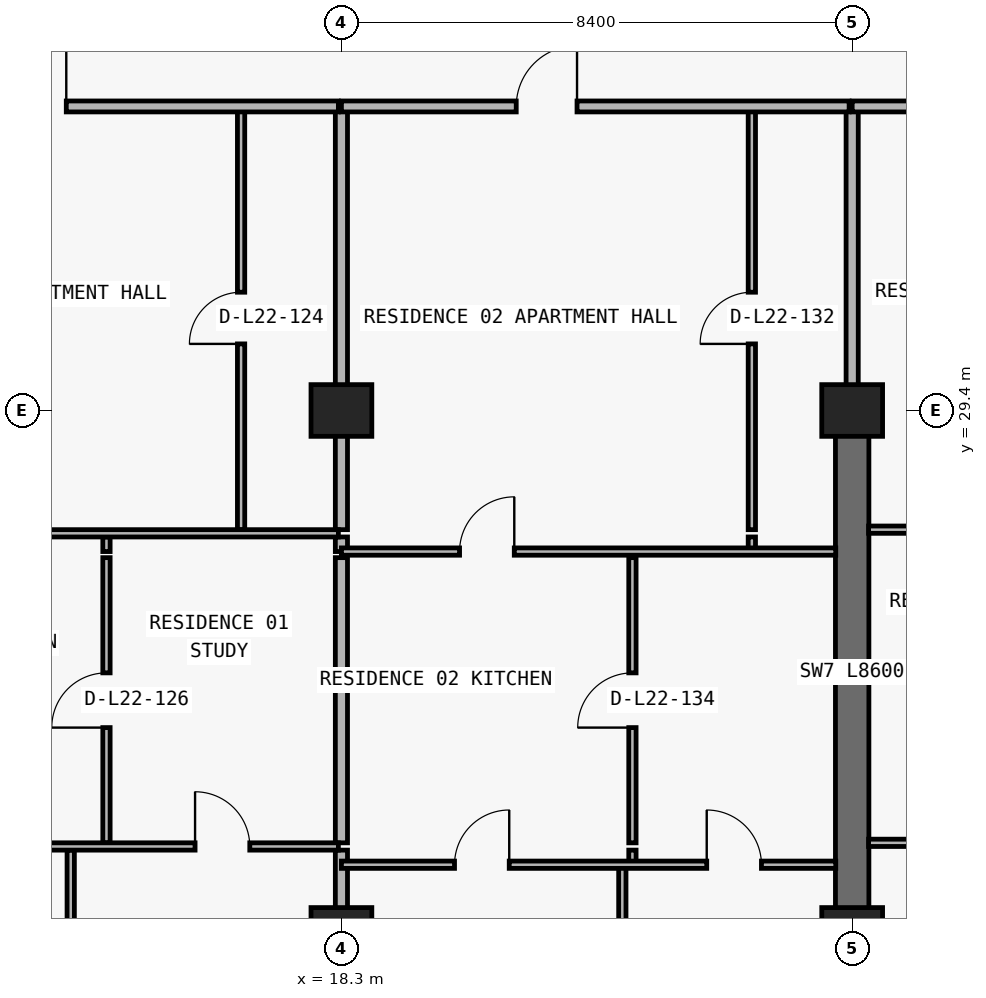
"""IFC4 building model, lengths in metres.
Left out: names, types, materials, properties, quantities, classifications, styles, units other than length and angle.
Written with IfcOpenShell. Run it as: python <this file> out.ifc"""

import sys

from ifc_helpers import new_model, si_unit, direction, frame, frame_2d, origin, origin_2d, place, context, subcontext, project, spatial, rectangle, extrude, element, fill, save


model = new_model("IFC4")
c1 = context("Model", 3, precision=1e-05, world=origin(), true_north=direction((0.0, 1.0)))
c2 = subcontext(c1, "Body", "Model", "MODEL_VIEW")
j1 = project(units=[si_unit("LENGTHUNIT", "METRE"), si_unit("PLANEANGLEUNIT", "RADIAN")], contexts=[c1])
p1 = place(None, origin())
s1 = spatial("IfcSite", under=j1, at=p1, CompositionType="ELEMENT")
p2 = place(p1, origin())
s2 = spatial("IfcBuilding", under=s1, at=p2, CompositionType="ELEMENT")
p3 = place(p2, frame((0.0, 0.0, 84.6)))
s3 = spatial("IfcBuildingStorey", under=s2, at=p3, CompositionType="ELEMENT", Elevation=84.6)
for number, where, z_axis, x_axis in (
    (1, (18.3, 20.8, 0.0), (0.0, 0.0, 1.0), (1.0, 0.0, 0.0)),
    (2, (26.7, 20.8, 0.0), (0.0, 0.0, 1.0), (1.0, 0.0, 0.0)),
    (3, (18.3, 29.4, 0.0), (0.0, 0.0, 1.0), (1.0, 0.0, 0.0)),
    (4, (26.7, 29.4, 0.0), (0.0, 0.0, 1.0), (1.0, 0.0, 0.0)),
):
    element("IfcColumn", number, at=place(p3, frame(where, z_axis=z_axis, x_axis=x_axis)), inside=s3, PredefinedType="COLUMN", context=c2, shape_type="SweptSolid", body=[
        extrude(rectangle(XDim=1.0, YDim=0.85, at=origin_2d()), origin(), (0.0, 0.0, 1.0), 3.05),
    ])
p4 = place(p3, frame((26.7, 20.8, 0.0), z_axis=(0.0, 0.0, 1.0), x_axis=(0.0, 1.0, 0.0)))
e5 = element("IfcWall", 5, at=p4, inside=s3, PredefinedType="SHEAR", context=c2, shape_type="SweptSolid", body=[
    extrude(rectangle(XDim=8.6, YDim=0.55, at=frame_2d((4.3, 0.0))), origin(), (0.0, 0.0, 1.0), 3.05),
])
p5 = place(p3, frame((13.848, 8.84, 0.0), z_axis=(0.0, 0.0, 1.0), x_axis=(0.0, 1.0, 0.0)))
e6 = element("IfcWall", 6, at=p5, inside=s3, PredefinedType="PARTITIONING", context=c2, shape_type="SweptSolid", body=[
    extrude(rectangle(XDim=13.33, YDim=0.12, at=frame_2d((6.665, 0.0))), origin(), (0.0, 0.0, 1.0), 3.05),
])
p6 = place(p3, frame((14.436, 22.29, 0.0), z_axis=(0.0, 0.0, 1.0), x_axis=(0.0, 1.0, 0.0)))
e7 = element("IfcWall", 7, at=p6, inside=s3, PredefinedType="PARTITIONING", context=c2, shape_type="SweptSolid", body=[
    extrude(rectangle(XDim=4.69, YDim=0.12, at=frame_2d((2.345, 0.0))), origin(), (0.0, 0.0, 1.0), 3.05),
])
p7 = place(p6, frame((1.895, 0.0, 0.0)))
e8 = element("IfcOpeningElement", 8, at=p7, cuts=e7, PredefinedType="OPENING", context=c2, shape_type="SweptSolid", body=[
    extrude(rectangle(XDim=0.9, YDim=2.15, at=frame_2d((0.45, 1.075))), frame((0.0, 0.07, 0.0), z_axis=(0.0, -1.0, 0.0), x_axis=(1.0, 0.0, 0.0)), (0.0, 0.0, 1.0), 0.14),
])
p8 = place(p3, frame((14.436, 27.08, 0.0), z_axis=(0.0, 0.0, 1.0), x_axis=(0.0, 1.0, 0.0)))
e9 = element("IfcWall", 9, at=p8, inside=s3, PredefinedType="PARTITIONING", context=c2, shape_type="SweptSolid", body=[
    extrude(rectangle(XDim=0.24, YDim=0.12, at=frame_2d((0.12, 0.0))), origin(), (0.0, 0.0, 1.0), 3.05),
])
p9 = place(p3, frame((16.65, 27.44, 0.0), z_axis=(0.0, 0.0, 1.0), x_axis=(0.0, 1.0, 0.0)))
e10 = element("IfcWall", 10, at=p9, inside=s3, PredefinedType="PARTITIONING", context=c2, shape_type="SweptSolid", body=[
    extrude(rectangle(XDim=6.96, YDim=0.12, at=frame_2d((3.48, 0.0))), origin(), (0.0, 0.0, 1.0), 3.05),
])
p10 = place(p9, frame((3.055, 0.0, 0.0)))
e11 = element("IfcOpeningElement", 11, at=p10, cuts=e10, PredefinedType="OPENING", context=c2, shape_type="SweptSolid", body=[
    extrude(rectangle(XDim=0.85, YDim=2.1, at=frame_2d((0.425, 1.05))), frame((0.0, 0.07, 0.0), z_axis=(0.0, -1.0, 0.0), x_axis=(1.0, 0.0, 0.0)), (0.0, 0.0, 1.0), 0.14),
])
p11 = place(p3, frame((18.3, 8.84, 0.0), z_axis=(0.0, 0.0, 1.0), x_axis=(0.0, 1.0, 0.0)))
e12 = element("IfcWall", 12, at=p11, inside=s3, PredefinedType="PARTITIONING", context=c2, shape_type="SweptSolid", body=[
    extrude(rectangle(XDim=13.33, YDim=0.2, at=frame_2d((6.665, 0.0))), origin(), (0.0, 0.0, 1.0), 2.174),
])
p12 = place(p3, frame((18.3, 22.29, 0.0), z_axis=(0.0, 0.0, 1.0), x_axis=(0.0, 1.0, 0.0)))
e13 = element("IfcWall", 13, at=p12, inside=s3, PredefinedType="PARTITIONING", context=c2, shape_type="SweptSolid", body=[
    extrude(rectangle(XDim=4.69, YDim=0.2, at=frame_2d((2.345, 0.0))), origin(), (0.0, 0.0, 1.0), 2.174),
])
p13 = place(p3, frame((18.3, 27.08, 0.0), z_axis=(0.0, 0.0, 1.0), x_axis=(0.0, 1.0, 0.0)))
e14 = element("IfcWall", 14, at=p13, inside=s3, PredefinedType="PARTITIONING", context=c2, shape_type="SweptSolid", body=[
    extrude(rectangle(XDim=0.24, YDim=0.2, at=frame_2d((0.12, 0.0))), origin(), (0.0, 0.0, 1.0), 2.174),
])
p14 = place(p3, frame((18.3, 27.44, 0.0), z_axis=(0.0, 0.0, 1.0), x_axis=(0.0, 1.0, 0.0)))
e15 = element("IfcWall", 15, at=p14, inside=s3, PredefinedType="PARTITIONING", context=c2, shape_type="SweptSolid", body=[
    extrude(rectangle(XDim=6.96, YDim=0.2, at=frame_2d((3.48, 0.0))), origin(), (0.0, 0.0, 1.0), 2.174),
])
p15 = place(p3, frame((22.92, 8.84, 0.0), z_axis=(0.0, 0.0, 1.0), x_axis=(0.0, 1.0, 0.0)))
e16 = element("IfcWall", 16, at=p15, inside=s3, PredefinedType="PARTITIONING", context=c2, shape_type="SweptSolid", body=[
    extrude(rectangle(XDim=13.09, YDim=0.12, at=frame_2d((6.545, 0.0))), origin(), (0.0, 0.0, 1.0), 3.05),
])
p16 = place(p3, frame((23.086, 21.935, 0.0), z_axis=(0.0, 0.0, 1.0), x_axis=(0.0, 1.0, 0.0)))
e17 = element("IfcWall", 17, at=p16, inside=s3, PredefinedType="PARTITIONING", context=c2, shape_type="SweptSolid", body=[
    extrude(rectangle(XDim=0.235, YDim=0.12, at=frame_2d((0.117, 0.0))), origin(), (0.0, 0.0, 1.0), 3.05),
])
p17 = place(p3, frame((23.086, 22.29, 0.0), z_axis=(0.0, 0.0, 1.0), x_axis=(0.0, 1.0, 0.0)))
e18 = element("IfcWall", 18, at=p17, inside=s3, PredefinedType="PARTITIONING", context=c2, shape_type="SweptSolid", body=[
    extrude(rectangle(XDim=4.69, YDim=0.12, at=frame_2d((2.345, 0.0))), origin(), (0.0, 0.0, 1.0), 3.05),
])
p18 = place(p17, frame((1.895, 0.0, 0.0)))
e19 = element("IfcOpeningElement", 19, at=p18, cuts=e18, PredefinedType="OPENING", context=c2, shape_type="SweptSolid", body=[
    extrude(rectangle(XDim=0.9, YDim=2.15, at=frame_2d((0.45, 1.075))), frame((0.0, 0.07, 0.0), z_axis=(0.0, -1.0, 0.0), x_axis=(1.0, 0.0, 0.0)), (0.0, 0.0, 1.0), 0.14),
])
p19 = place(p3, frame((25.05, 27.08, 0.0), z_axis=(0.0, 0.0, 1.0), x_axis=(0.0, 1.0, 0.0)))
e20 = element("IfcWall", 20, at=p19, inside=s3, PredefinedType="PARTITIONING", context=c2, shape_type="SweptSolid", body=[
    extrude(rectangle(XDim=0.24, YDim=0.12, at=frame_2d((0.12, 0.0))), origin(), (0.0, 0.0, 1.0), 3.05),
])
p20 = place(p3, frame((25.05, 27.44, 0.0), z_axis=(0.0, 0.0, 1.0), x_axis=(0.0, 1.0, 0.0)))
e21 = element("IfcWall", 21, at=p20, inside=s3, PredefinedType="PARTITIONING", context=c2, shape_type="SweptSolid", body=[
    extrude(rectangle(XDim=6.96, YDim=0.12, at=frame_2d((3.48, 0.0))), origin(), (0.0, 0.0, 1.0), 3.05),
])
p21 = place(p20, frame((3.055, 0.0, 0.0)))
e22 = element("IfcOpeningElement", 22, at=p21, cuts=e21, PredefinedType="OPENING", context=c2, shape_type="SweptSolid", body=[
    extrude(rectangle(XDim=0.85, YDim=2.1, at=frame_2d((0.425, 1.05))), frame((0.0, 0.07, 0.0), z_axis=(0.0, -1.0, 0.0), x_axis=(1.0, 0.0, 0.0)), (0.0, 0.0, 1.0), 0.14),
])
p22 = place(p3, frame((26.7, 29.405, 0.0), z_axis=(0.0, 0.0, 1.0), x_axis=(0.0, 1.0, 0.0)))
e23 = element("IfcWall", 23, at=p22, inside=s3, PredefinedType="PARTITIONING", context=c2, shape_type="SweptSolid", body=[
    extrude(rectangle(XDim=4.995, YDim=0.2, at=frame_2d((2.498, 0.0))), origin(), (0.0, 0.0, 1.0), 2.335),
])
p23 = place(p3, frame((18.3, 21.93, 0.0), z_axis=(0.0, 0.0, 1.0), x_axis=(1.0, 0.0, 0.0)))
e24 = element("IfcWall", 24, at=p23, inside=s3, PredefinedType="PARTITIONING", context=c2, shape_type="SweptSolid", body=[
    extrude(rectangle(XDim=8.13, YDim=0.12, at=frame_2d((4.065, 0.0))), origin(), (0.0, 0.0, 1.0), 3.05),
])
p24 = place(p23, frame((1.86, 0.0, 0.0)))
e25 = element("IfcOpeningElement", 25, at=p24, cuts=e24, PredefinedType="OPENING", context=c2, shape_type="SweptSolid", body=[
    extrude(rectangle(XDim=0.9, YDim=2.15, at=frame_2d((0.45, 1.075))), frame((0.0, 0.07, 0.0), z_axis=(0.0, -1.0, 0.0), x_axis=(1.0, 0.0, 0.0)), (0.0, 0.0, 1.0), 0.14),
])
p25 = place(p23, frame((6.008, 0.0, 0.0)))
e26 = element("IfcOpeningElement", 26, at=p25, cuts=e24, PredefinedType="OPENING", context=c2, shape_type="SweptSolid", body=[
    extrude(rectangle(XDim=0.9, YDim=2.15, at=frame_2d((0.45, 1.075))), frame((0.0, 0.07, 0.0), z_axis=(0.0, -1.0, 0.0), x_axis=(1.0, 0.0, 0.0)), (0.0, 0.0, 1.0), 0.14),
])
p26 = place(p3, frame((9.9, 22.23, 0.0), z_axis=(0.0, 0.0, 1.0), x_axis=(1.0, 0.0, 0.0)))
e27 = element("IfcWall", 27, at=p26, inside=s3, PredefinedType="PARTITIONING", context=c2, shape_type="SweptSolid", body=[
    extrude(rectangle(XDim=8.35, YDim=0.12, at=frame_2d((4.175, 0.0))), origin(), (0.0, 0.0, 1.0), 3.05),
])
p27 = place(p26, frame((1.524, 0.0, 0.0)))
e28 = element("IfcOpeningElement", 28, at=p27, cuts=e27, PredefinedType="OPENING", context=c2, shape_type="SweptSolid", body=[
    extrude(rectangle(XDim=0.9, YDim=2.15, at=frame_2d((0.45, 1.075))), frame((0.0, 0.07, 0.0), z_axis=(0.0, -1.0, 0.0), x_axis=(1.0, 0.0, 0.0)), (0.0, 0.0, 1.0), 0.14),
])
p28 = place(p26, frame((5.993, 0.0, 0.0)))
e29 = element("IfcOpeningElement", 29, at=p28, cuts=e27, PredefinedType="OPENING", context=c2, shape_type="SweptSolid", body=[
    extrude(rectangle(XDim=0.9, YDim=2.15, at=frame_2d((0.45, 1.075))), frame((0.0, 0.07, 0.0), z_axis=(0.0, -1.0, 0.0), x_axis=(1.0, 0.0, 0.0)), (0.0, 0.0, 1.0), 0.14),
])
p29 = place(p3, frame((26.97, 22.29, 0.0), z_axis=(0.0, 0.0, 1.0), x_axis=(1.0, 0.0, 0.0)))
e30 = element("IfcWall", 30, at=p29, inside=s3, PredefinedType="PARTITIONING", context=c2, shape_type="SweptSolid", body=[
    extrude(rectangle(XDim=8.125, YDim=0.12, at=frame_2d((4.062, 0.0))), origin(), (0.0, 0.0, 1.0), 3.05),
])
p30 = place(p29, frame((1.389, 0.0, 0.0)))
e31 = element("IfcOpeningElement", 31, at=p30, cuts=e30, PredefinedType="OPENING", context=c2, shape_type="SweptSolid", body=[
    extrude(rectangle(XDim=0.9, YDim=2.15, at=frame_2d((0.45, 1.075))), frame((0.0, 0.07, 0.0), z_axis=(0.0, -1.0, 0.0), x_axis=(1.0, 0.0, 0.0)), (0.0, 0.0, 1.0), 0.14),
])
p31 = place(p29, frame((5.621, 0.0, 0.0)))
e32 = element("IfcOpeningElement", 32, at=p31, cuts=e30, PredefinedType="OPENING", context=c2, shape_type="SweptSolid", body=[
    extrude(rectangle(XDim=0.9, YDim=2.15, at=frame_2d((0.45, 1.075))), frame((0.0, 0.07, 0.0), z_axis=(0.0, -1.0, 0.0), x_axis=(1.0, 0.0, 0.0)), (0.0, 0.0, 1.0), 0.14),
])
p32 = place(p3, frame((18.3, 27.08, 0.0), z_axis=(0.0, 0.0, 1.0), x_axis=(1.0, 0.0, 0.0)))
e33 = element("IfcWall", 33, at=p32, inside=s3, PredefinedType="PARTITIONING", context=c2, shape_type="SweptSolid", body=[
    extrude(rectangle(XDim=8.13, YDim=0.12, at=frame_2d((4.065, 0.0))), origin(), (0.0, 0.0, 1.0), 3.05),
])
p33 = place(p32, frame((1.943, 0.0, 0.0)))
e34 = element("IfcOpeningElement", 34, at=p33, cuts=e33, PredefinedType="OPENING", context=c2, shape_type="SweptSolid", body=[
    extrude(rectangle(XDim=0.9, YDim=2.15, at=frame_2d((0.45, 1.075))), frame((0.0, 0.07, 0.0), z_axis=(0.0, -1.0, 0.0), x_axis=(1.0, 0.0, 0.0)), (0.0, 0.0, 1.0), 0.14),
])
p34 = place(p3, frame((9.9, 27.38, 0.0), z_axis=(0.0, 0.0, 1.0), x_axis=(1.0, 0.0, 0.0)))
e35 = element("IfcWall", 35, at=p34, inside=s3, PredefinedType="PARTITIONING", context=c2, shape_type="SweptSolid", body=[
    extrude(rectangle(XDim=8.35, YDim=0.12, at=frame_2d((4.175, 0.0))), origin(), (0.0, 0.0, 1.0), 3.05),
])
p35 = place(p34, frame((1.818, 0.0, 0.0)))
e36 = element("IfcOpeningElement", 36, at=p35, cuts=e35, PredefinedType="OPENING", context=c2, shape_type="SweptSolid", body=[
    extrude(rectangle(XDim=0.9, YDim=2.15, at=frame_2d((0.45, 1.075))), frame((0.0, 0.07, 0.0), z_axis=(0.0, -1.0, 0.0), x_axis=(1.0, 0.0, 0.0)), (0.0, 0.0, 1.0), 0.14),
])
p36 = place(p3, frame((26.97, 27.44, 0.0), z_axis=(0.0, 0.0, 1.0), x_axis=(1.0, 0.0, 0.0)))
e37 = element("IfcWall", 37, at=p36, inside=s3, PredefinedType="PARTITIONING", context=c2, shape_type="SweptSolid", body=[
    extrude(rectangle(XDim=8.13, YDim=0.12, at=frame_2d((4.065, 0.0))), origin(), (0.0, 0.0, 1.0), 3.05),
])
p37 = place(p36, frame((1.558, 0.0, 0.0)))
e38 = element("IfcOpeningElement", 38, at=p37, cuts=e37, PredefinedType="OPENING", context=c2, shape_type="SweptSolid", body=[
    extrude(rectangle(XDim=0.9, YDim=2.15, at=frame_2d((0.45, 1.075))), frame((0.0, 0.07, 0.0), z_axis=(0.0, -1.0, 0.0), x_axis=(1.0, 0.0, 0.0)), (0.0, 0.0, 1.0), 0.14),
])
p38 = place(p3, frame((7.705, 34.4, 0.0), z_axis=(0.0, 0.0, 1.0), x_axis=(1.0, 0.0, 0.0)))
e39 = element("IfcWall", 39, at=p38, inside=s3, PredefinedType="PARTITIONING", context=c2, shape_type="SweptSolid", body=[
    extrude(rectangle(XDim=10.545, YDim=0.18, at=frame_2d((5.272, 0.0))), origin(), (0.0, 0.0, 1.0), 3.05),
])
p39 = place(p38, frame((5.07, 0.0, 0.0)))
e40 = element("IfcOpeningElement", 40, at=p39, cuts=e39, PredefinedType="OPENING", context=c2, shape_type="SweptSolid", body=[
    extrude(rectangle(XDim=1.0, YDim=2.2, at=frame_2d((0.5, 1.1))), frame((0.0, 0.1, 0.0), z_axis=(0.0, -1.0, 0.0), x_axis=(1.0, 0.0, 0.0)), (0.0, 0.0, 1.0), 0.2),
])
p40 = place(p3, frame((18.3, 34.4, 0.0), z_axis=(0.0, 0.0, 1.0), x_axis=(1.0, 0.0, 0.0)))
e41 = element("IfcWall", 41, at=p40, inside=s3, PredefinedType="PARTITIONING", context=c2, shape_type="SweptSolid", body=[
    extrude(rectangle(XDim=8.35, YDim=0.18, at=frame_2d((4.175, 0.0))), origin(), (0.0, 0.0, 1.0), 3.05),
])
p41 = place(p40, frame((2.875, 0.0, 0.0)))
e42 = element("IfcOpeningElement", 42, at=p41, cuts=e41, PredefinedType="OPENING", context=c2, shape_type="SweptSolid", body=[
    extrude(rectangle(XDim=1.0, YDim=2.2, at=frame_2d((0.5, 1.1))), frame((0.0, 0.1, 0.0), z_axis=(0.0, -1.0, 0.0), x_axis=(1.0, 0.0, 0.0)), (0.0, 0.0, 1.0), 0.2),
])
p42 = place(p3, frame((26.7, 34.4, 0.0), z_axis=(0.0, 0.0, 1.0), x_axis=(1.0, 0.0, 0.0)))
e43 = element("IfcWall", 43, at=p42, inside=s3, PredefinedType="PARTITIONING", context=c2, shape_type="SweptSolid", body=[
    extrude(rectangle(XDim=29.186, YDim=0.18, at=frame_2d((14.593, 0.0))), origin(), (0.0, 0.0, 1.0), 3.05),
])
p43 = place(p42, frame((2.875, 0.0, 0.0)))
e44 = element("IfcOpeningElement", 44, at=p43, cuts=e43, PredefinedType="OPENING", context=c2, shape_type="SweptSolid", body=[
    extrude(rectangle(XDim=1.0, YDim=2.2, at=frame_2d((0.5, 1.1))), frame((0.0, 0.1, 0.0), z_axis=(0.0, -1.0, 0.0), x_axis=(1.0, 0.0, 0.0)), (0.0, 0.0, 1.0), 0.2),
])
p44 = place(p42, frame((10.95, 0.0, 0.0)))
e45 = element("IfcOpeningElement", 45, at=p44, cuts=e43, PredefinedType="OPENING", context=c2, shape_type="SweptSolid", body=[
    extrude(rectangle(XDim=1.0, YDim=2.2, at=frame_2d((0.5, 1.1))), frame((0.0, 0.1, 0.0), z_axis=(0.0, -1.0, 0.0), x_axis=(1.0, 0.0, 0.0)), (0.0, 0.0, 1.0), 0.2),
])
p45 = place(p42, frame((26.293, 0.0, 0.0)))
e46 = element("IfcOpeningElement", 46, at=p45, cuts=e43, PredefinedType="OPENING", context=c2, shape_type="SweptSolid", body=[
    extrude(rectangle(XDim=1.0, YDim=2.2, at=frame_2d((0.5, 1.1))), frame((0.0, 0.1, 0.0), z_axis=(0.0, -1.0, 0.0), x_axis=(1.0, 0.0, 0.0)), (0.0, 0.0, 1.0), 0.2),
])
p46 = place(p39, origin())
e47 = element("IfcDoor", 47, at=p46, inside=s3, OperationType="SINGLE_SWING_RIGHT", PredefinedType="DOOR", context=c2, shape_type="SweptSolid", body=[
    extrude(rectangle(XDim=1.0, YDim=2.2, at=frame_2d((0.5, 1.1))), frame((0.0, 0.025, 0.0), z_axis=(0.0, -1.0, 0.0), x_axis=(1.0, 0.0, 0.0)), (0.0, 0.0, 1.0), 0.05),
])
fill(e40, e47)
p47 = place(p10, origin())
e48 = element("IfcDoor", 48, at=p47, inside=s3, OperationType="SINGLE_SWING_LEFT", PredefinedType="DOOR", context=c2, shape_type="SweptSolid", body=[
    extrude(rectangle(XDim=0.85, YDim=2.1, at=frame_2d((0.425, 1.05))), frame((0.0, 0.025, 0.0), z_axis=(0.0, -1.0, 0.0), x_axis=(1.0, 0.0, 0.0)), (0.0, 0.0, 1.0), 0.05),
])
fill(e11, e48)
p48 = place(p7, origin())
e49 = element("IfcDoor", 49, at=p48, inside=s3, OperationType="SINGLE_SWING_LEFT", PredefinedType="DOOR", context=c2, shape_type="SweptSolid", body=[
    extrude(rectangle(XDim=0.9, YDim=2.15, at=frame_2d((0.45, 1.075))), frame((0.0, 0.025, 0.0), z_axis=(0.0, -1.0, 0.0), x_axis=(1.0, 0.0, 0.0)), (0.0, 0.0, 1.0), 0.05),
])
fill(e8, e49)
p49 = place(p28, origin())
e50 = element("IfcDoor", 50, at=p49, inside=s3, OperationType="SINGLE_SWING_LEFT", PredefinedType="DOOR", context=c2, shape_type="SweptSolid", body=[
    extrude(rectangle(XDim=0.9, YDim=2.15, at=frame_2d((0.45, 1.075))), frame((0.0, 0.025, 0.0), z_axis=(0.0, -1.0, 0.0), x_axis=(1.0, 0.0, 0.0)), (0.0, 0.0, 1.0), 0.05),
])
fill(e29, e50)
p50 = place(p41, origin())
e51 = element("IfcDoor", 51, at=p50, inside=s3, OperationType="SINGLE_SWING_RIGHT", PredefinedType="DOOR", context=c2, shape_type="SweptSolid", body=[
    extrude(rectangle(XDim=1.0, YDim=2.2, at=frame_2d((0.5, 1.1))), frame((0.0, 0.025, 0.0), z_axis=(0.0, -1.0, 0.0), x_axis=(1.0, 0.0, 0.0)), (0.0, 0.0, 1.0), 0.05),
])
fill(e42, e51)
p51 = place(p21, origin())
e52 = element("IfcDoor", 52, at=p51, inside=s3, OperationType="SINGLE_SWING_LEFT", PredefinedType="DOOR", context=c2, shape_type="SweptSolid", body=[
    extrude(rectangle(XDim=0.85, YDim=2.1, at=frame_2d((0.425, 1.05))), frame((0.0, 0.025, 0.0), z_axis=(0.0, -1.0, 0.0), x_axis=(1.0, 0.0, 0.0)), (0.0, 0.0, 1.0), 0.05),
])
fill(e22, e52)
p52 = place(p33, origin())
e53 = element("IfcDoor", 53, at=p52, inside=s3, OperationType="SINGLE_SWING_RIGHT", PredefinedType="DOOR", context=c2, shape_type="SweptSolid", body=[
    extrude(rectangle(XDim=0.9, YDim=2.15, at=frame_2d((0.45, 1.075))), frame((0.0, 0.025, 0.0), z_axis=(0.0, -1.0, 0.0), x_axis=(1.0, 0.0, 0.0)), (0.0, 0.0, 1.0), 0.05),
])
fill(e34, e53)
p53 = place(p18, origin())
e54 = element("IfcDoor", 54, at=p53, inside=s3, OperationType="SINGLE_SWING_LEFT", PredefinedType="DOOR", context=c2, shape_type="SweptSolid", body=[
    extrude(rectangle(XDim=0.9, YDim=2.15, at=frame_2d((0.45, 1.075))), frame((0.0, 0.025, 0.0), z_axis=(0.0, -1.0, 0.0), x_axis=(1.0, 0.0, 0.0)), (0.0, 0.0, 1.0), 0.05),
])
fill(e19, e54)
p54 = place(p24, origin())
e55 = element("IfcDoor", 55, at=p54, inside=s3, OperationType="SINGLE_SWING_RIGHT", PredefinedType="DOOR", context=c2, shape_type="SweptSolid", body=[
    extrude(rectangle(XDim=0.9, YDim=2.15, at=frame_2d((0.45, 1.075))), frame((0.0, 0.025, 0.0), z_axis=(0.0, -1.0, 0.0), x_axis=(1.0, 0.0, 0.0)), (0.0, 0.0, 1.0), 0.05),
])
fill(e25, e55)
p55 = place(p25, origin())
e56 = element("IfcDoor", 56, at=p55, inside=s3, OperationType="SINGLE_SWING_LEFT", PredefinedType="DOOR", context=c2, shape_type="SweptSolid", body=[
    extrude(rectangle(XDim=0.9, YDim=2.15, at=frame_2d((0.45, 1.075))), frame((0.0, 0.025, 0.0), z_axis=(0.0, -1.0, 0.0), x_axis=(1.0, 0.0, 0.0)), (0.0, 0.0, 1.0), 0.05),
])
fill(e26, e56)
save(model, sys.argv[1])
